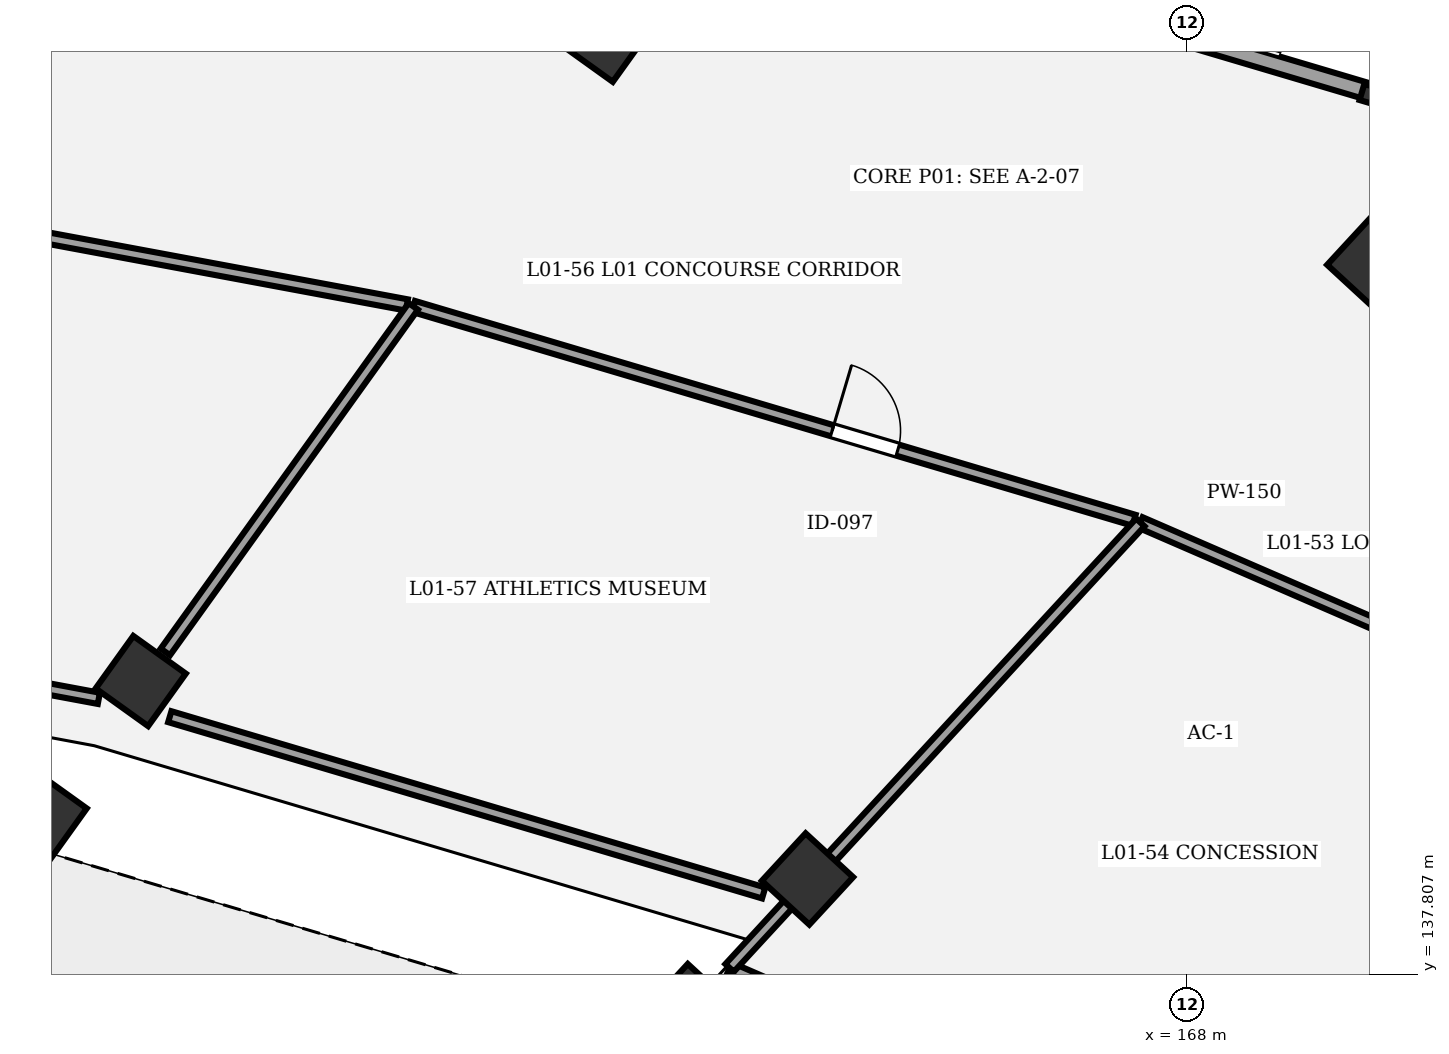
"""IFC4 building model, lengths in metres.
Left out: names, types, materials, properties, quantities, classifications, styles, units other than length and angle.
Written with IfcOpenShell. Run it as: python <this file> out.ifc"""

import sys

from ifc_helpers import new_model, si_unit, direction, frame, frame_2d, origin, origin_2d, place, context, subcontext, project, spatial, rectangle, extrude, element, fill, save


model = new_model("IFC4")
c1 = context("Model", 3, precision=1e-05, world=origin(), true_north=direction((0.0, 1.0)))
c2 = subcontext(c1, "Body", "Model", "MODEL_VIEW")
j1 = project(units=[si_unit("LENGTHUNIT", "METRE"), si_unit("PLANEANGLEUNIT", "RADIAN")], contexts=[c1])
p1 = place(None, origin())
s1 = spatial("IfcSite", under=j1, at=p1, CompositionType="ELEMENT")
p2 = place(p1, origin())
s2 = spatial("IfcBuilding", under=s1, at=p2, CompositionType="ELEMENT")
p3 = place(p2, frame((0.0, 0.0, 5.4)))
s3 = spatial("IfcBuildingStorey", under=s2, at=p3, CompositionType="ELEMENT", Elevation=5.4)
p4 = place(p3, frame((161.45, 137.379, 0.0), z_axis=(0.0, 0.0, 1.0), x_axis=(0.677903094969, 0.735151272753, 0.0)))
e1 = element("IfcColumn", 1, at=p4, inside=s3, PredefinedType="COLUMN", context=c2, shape_type="SweptSolid", body=[
    extrude(rectangle(XDim=0.8, YDim=0.8, at=origin_2d()), origin(), (0.0, 0.0, 1.0), 4.8),
])
p5 = place(p3, frame((163.003, 139.062, 0.0), z_axis=(0.0, 0.0, 1.0), x_axis=(0.677903094969, 0.735151272753, 0.0)))
e2 = element("IfcColumn", 2, at=p5, inside=s3, PredefinedType="COLUMN", context=c2, shape_type="SweptSolid", body=[
    extrude(rectangle(XDim=0.85, YDim=0.85, at=origin_2d()), origin(), (0.0, 0.0, 1.0), 4.8),
])
p6 = place(p3, frame((170.476, 147.168, 0.0), z_axis=(0.0, 0.0, 1.0), x_axis=(0.677903094969, 0.735151272753, 0.0)))
e3 = element("IfcColumn", 3, at=p6, inside=s3, PredefinedType="COLUMN", context=c2, shape_type="SweptSolid", body=[
    extrude(rectangle(XDim=0.9, YDim=0.9, at=origin_2d()), origin(), (0.0, 0.0, 1.0), 4.8),
])
p7 = place(p3, frame((152.962, 139.899, 0.0), z_axis=(0.0, 0.0, 1.0), x_axis=(0.582974127943, 0.812490717577, 0.0)))
e4 = element("IfcColumn", 4, at=p7, inside=s3, PredefinedType="COLUMN", context=c2, shape_type="SweptSolid", body=[
    extrude(rectangle(XDim=0.8, YDim=0.8, at=origin_2d()), origin(), (0.0, 0.0, 1.0), 4.8),
])
p8 = place(p3, frame((154.23, 141.667, 0.0), z_axis=(0.0, 0.0, 1.0), x_axis=(0.582974127943, 0.812490717577, 0.0)))
e5 = element("IfcColumn", 5, at=p8, inside=s3, PredefinedType="COLUMN", context=c2, shape_type="SweptSolid", body=[
    extrude(rectangle(XDim=0.85, YDim=0.85, at=origin_2d()), origin(), (0.0, 0.0, 1.0), 4.8),
])
p9 = place(p3, frame((160.338, 150.177, 0.0), z_axis=(0.0, 0.0, 1.0), x_axis=(0.582974127943, 0.812490717577, 0.0)))
e6 = element("IfcColumn", 6, at=p9, inside=s3, PredefinedType="COLUMN", context=c2, shape_type="SweptSolid", body=[
    extrude(rectangle(XDim=0.9, YDim=0.9, at=origin_2d()), origin(), (0.0, 0.0, 1.0), 4.8),
])
p10 = place(p3, frame((170.442, 149.373, 0.0), z_axis=(0.0, 0.0, 1.0), x_axis=(0.958670893355, -0.284517342588, 0.0)))
e7 = element("IfcColumn", 7, at=p10, inside=s3, PredefinedType="COLUMN", context=c2, shape_type="SweptSolid", body=[
    extrude(rectangle(XDim=0.3, YDim=0.22, at=origin_2d()), origin(), (0.0, 0.0, 1.0), 4.8),
])
p11 = place(p3, frame((163.663, 151.416, 0.0), z_axis=(0.0, 0.0, 1.0), x_axis=(0.958665631999, -0.284535069937, 0.0)))
e8 = element("IfcWall", 8, at=p11, inside=s3, PredefinedType="SHEAR", context=c2, shape_type="SweptSolid", body=[
    extrude(rectangle(XDim=8.54, YDim=0.22, at=frame_2d((4.27, 0.0))), origin(), (0.0, 0.0, 1.0), 4.55),
])
p12 = place(p11, frame((0.3, 0.0, 0.0)))
e9 = element("IfcOpeningElement", 9, at=p12, cuts=e8, PredefinedType="OPENING", context=c2, shape_type="SweptSolid", body=[
    extrude(rectangle(XDim=1.15, YDim=2.15, at=frame_2d((0.575, 1.075))), frame((0.0, 0.12, 0.0), z_axis=(0.0, -1.0, 0.0), x_axis=(1.0, 0.0, 0.0)), (0.0, 0.0, 1.0), 0.24),
])
p13 = place(p3, frame((167.382, 143.753, 0.0), z_axis=(0.0, 0.0, 1.0), x_axis=(0.917494590455, -0.397748257677, 0.0)))
e10 = element("IfcWall", 10, at=p13, inside=s3, PredefinedType="PARTITIONING", context=c2, shape_type="SweptSolid", body=[
    extrude(rectangle(XDim=9.049, YDim=0.15, at=frame_2d((4.525, 0.0))), origin(), (0.0, 0.0, 1.0), 3.55),
])
p14 = place(p13, frame((5.991, 0.0, 0.0)))
e11 = element("IfcOpeningElement", 11, at=p14, cuts=e10, PredefinedType="OPENING", context=c2, shape_type="SweptSolid", body=[
    extrude(rectangle(XDim=1.32, YDim=2.2, at=frame_2d((0.66, 1.1))), frame((0.0, 0.085, 0.0), z_axis=(0.0, -1.0, 0.0), x_axis=(1.0, 0.0, 0.0)), (0.0, 0.0, 1.0), 0.17),
])
p15 = place(p3, frame((157.817, 146.596, 0.0), z_axis=(0.0, 0.0, 1.0), x_axis=(0.958655809656, -0.284568161629, 0.0)))
e12 = element("IfcWall", 12, at=p15, inside=s3, PredefinedType="PARTITIONING", context=c2, shape_type="SweptSolid", body=[
    extrude(rectangle(XDim=9.891, YDim=0.15, at=frame_2d((4.946, 0.0))), origin(), (0.0, 0.0, 1.0), 3.55),
])
p16 = place(p15, frame((5.748, 0.0, 0.0)))
e13 = element("IfcOpeningElement", 13, at=p16, cuts=e12, PredefinedType="OPENING", context=c2, shape_type="SweptSolid", body=[
    extrude(rectangle(XDim=0.9, YDim=2.3, at=frame_2d((0.45, 1.15))), frame((0.0, 0.085, 0.0), z_axis=(0.0, -1.0, 0.0), x_axis=(1.0, 0.0, 0.0)), (0.0, 0.0, 1.0), 0.17),
])
p17 = place(p3, frame((146.884, 148.635, 0.0), z_axis=(0.0, 0.0, 1.0), x_axis=(0.983097372707, -0.183083466695, 0.0)))
e14 = element("IfcWall", 14, at=p17, inside=s3, PredefinedType="PARTITIONING", context=c2, shape_type="SweptSolid", body=[
    extrude(rectangle(XDim=11.035, YDim=0.15, at=frame_2d((5.517, 0.0))), origin(), (0.0, 0.0, 1.0), 3.55),
])
p18 = place(p17, frame((5.047, 0.0, 0.0)))
e15 = element("IfcOpeningElement", 15, at=p18, cuts=e14, PredefinedType="OPENING", context=c2, shape_type="SweptSolid", body=[
    extrude(rectangle(XDim=0.94, YDim=2.3, at=frame_2d((0.47, 1.15))), frame((0.0, 0.085, 0.0), z_axis=(0.0, -1.0, 0.0), x_axis=(1.0, 0.0, 0.0)), (0.0, 0.0, 1.0), 0.17),
])
p19 = place(p3, frame((169.49, 134.627, 0.0), z_axis=(0.0, 0.0, 1.0), x_axis=(0.752565808221, 0.658517049359, 0.0)))
e16 = element("IfcWall", 16, at=p19, inside=s3, PredefinedType="PARTITIONING", context=c2, shape_type="SweptSolid", body=[
    extrude(rectangle(XDim=8.335, YDim=0.15, at=frame_2d((4.168, 0.0))), origin(), (0.0, 0.0, 1.0), 3.55),
])
p20 = place(p3, frame((169.415, 134.668, 0.0), z_axis=(0.0, 0.0, 1.0), x_axis=(-0.917496646276, 0.397743515436, 0.0)))
e17 = element("IfcWall", 17, at=p20, inside=s3, PredefinedType="PARTITIONING", context=c2, shape_type="SweptSolid", body=[
    extrude(rectangle(XDim=8.106, YDim=0.15, at=frame_2d((4.053, 0.0))), origin(), (0.0, 0.0, 1.0), 3.55),
])
p21 = place(p3, frame((161.978, 137.892, 0.0), z_axis=(0.0, 0.0, 1.0), x_axis=(0.677861530409, 0.735189598397, 0.0)))
e18 = element("IfcWall", 18, at=p21, inside=s3, PredefinedType="PARTITIONING", context=c2, shape_type="SweptSolid", body=[
    extrude(rectangle(XDim=7.972, YDim=0.15, at=frame_2d((3.986, 0.0))), origin(), (0.0, 0.0, 1.0), 3.55),
])
p22 = place(p3, frame((162.427, 138.878, 0.0), z_axis=(0.0, 0.0, 1.0), x_axis=(-0.95866142128, 0.284549256457, 0.0)))
e19 = element("IfcWall", 19, at=p22, inside=s3, PredefinedType="PARTITIONING", context=c2, shape_type="SweptSolid", body=[
    extrude(rectangle(XDim=8.151, YDim=0.15, at=frame_2d((4.075, 0.0))), origin(), (0.0, 0.0, 1.0), 3.55),
])
p23 = place(p3, frame((154.554, 142.049, 0.0), z_axis=(0.0, 0.0, 1.0), x_axis=(0.583015574976, 0.812460977116, 0.0)))
e20 = element("IfcWall", 20, at=p23, inside=s3, PredefinedType="PARTITIONING", context=c2, shape_type="SweptSolid", body=[
    extrude(rectangle(XDim=5.596, YDim=0.15, at=frame_2d((2.798, 0.0))), origin(), (0.0, 0.0, 1.0), 3.55),
])
p24 = place(p3, frame((153.679, 141.439, 0.0), z_axis=(0.0, 0.0, 1.0), x_axis=(-0.983094403703, 0.18309940854, 0.0)))
e21 = element("IfcWall", 21, at=p24, inside=s3, PredefinedType="PARTITIONING", context=c2, shape_type="SweptSolid", body=[
    extrude(rectangle(XDim=9.199, YDim=0.15, at=frame_2d((4.6, 0.0))), origin(), (0.0, 0.0, 1.0), 3.55),
])
p25 = place(p16, origin())
e22 = element("IfcDoor", 22, at=p25, inside=s3, OperationType="SINGLE_SWING_LEFT", PredefinedType="DOOR", context=c2, shape_type="SweptSolid", body=[
    extrude(rectangle(XDim=0.9, YDim=2.3, at=frame_2d((0.45, 1.15))), frame((0.0, 0.025, 0.0), z_axis=(0.0, -1.0, 0.0), x_axis=(1.0, 0.0, 0.0)), (0.0, 0.0, 1.0), 0.05),
])
fill(e13, e22)
save(model, sys.argv[1])
